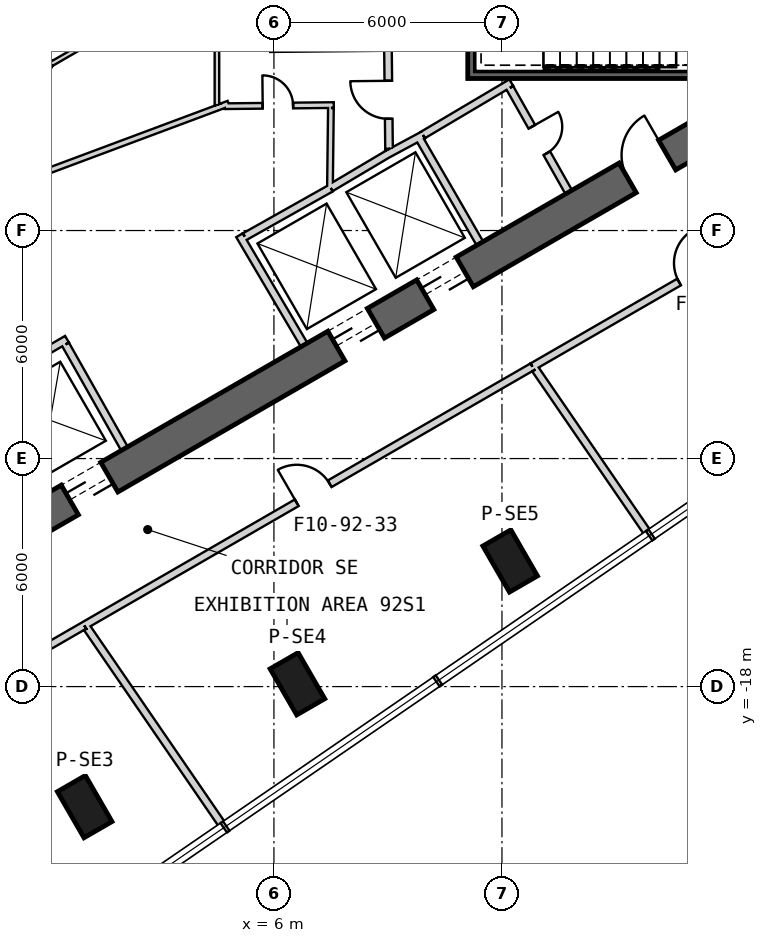
"""IFC4 building model, lengths in metres.
Left out: names, types, materials, properties, quantities, classifications, styles, units other than length and angle.
Written with IfcOpenShell. Run it as: python <this file> out.ifc"""

import sys

from ifc_helpers import new_model, si_unit, direction, frame, frame_2d, origin, origin_2d, place, context, subcontext, project, spatial, rectangle, extrude, element, fill, save


model = new_model("IFC4")
c1 = context("Model", 3, precision=1e-05, world=origin(), true_north=direction((0.0, 1.0)))
c2 = subcontext(c1, "Body", "Model", "MODEL_VIEW")
j1 = project(units=[si_unit("LENGTHUNIT", "METRE"), si_unit("PLANEANGLEUNIT", "RADIAN")], contexts=[c1])
p1 = place(None, origin())
s1 = spatial("IfcSite", under=j1, at=p1, CompositionType="ELEMENT")
p2 = place(p1, origin())
s2 = spatial("IfcBuilding", under=s1, at=p2, CompositionType="ELEMENT")
p3 = place(p2, frame((0.0, 0.0, 404.8)))
s3 = spatial("IfcBuildingStorey", under=s2, at=p3, CompositionType="ELEMENT", Elevation=404.8)
for number, where, z_axis, x_axis in (
    (1, (1.02, -21.159, 0.0), (0.0, 0.0, 1.0), (0.5, -0.866, 0.0)),
    (2, (6.618, -17.927, 0.0), (0.0, 0.0, 1.0), (0.5, -0.866, 0.0)),
    (3, (12.216, -14.695, 0.0), (0.0, 0.0, 1.0), (0.5, -0.866, 0.0)),
):
    element("IfcColumn", number, at=place(p3, frame(where, z_axis=z_axis, x_axis=x_axis)), inside=s3, PredefinedType="COLUMN", context=c2, shape_type="SweptSolid", body=[
        extrude(rectangle(XDim=1.4, YDim=0.85, at=origin_2d()), origin(), (0.0, 0.0, 1.0), 5.25),
    ])
p4 = place(p3, frame((-7.825, -17.97, 0.0), z_axis=(0.0, 0.0, 1.0), x_axis=(0.866028369851, 0.499994862586, 0.0)))
e4 = element("IfcWall", 4, at=p4, inside=s3, PredefinedType="SHEAR", context=c2, shape_type="SweptSolid", body=[
    extrude(rectangle(XDim=31.523, YDim=0.9, at=frame_2d((15.762, 0.0))), origin(), (0.0, 0.0, 1.0), 5.5),
])
p5 = place(p4, frame((7.062, 0.0, 0.0)))
e5 = element("IfcOpeningElement", 5, at=p5, cuts=e4, PredefinedType="OPENING", context=c2, shape_type="SweptSolid", body=[
    extrude(rectangle(XDim=1.2, YDim=2.4, at=frame_2d((0.6, 1.2))), frame((0.0, 0.46, 0.0), z_axis=(0.0, -1.0, 0.0), x_axis=(1.0, 0.0, 0.0)), (0.0, 0.0, 1.0), 0.92),
])
p6 = place(p4, frame((9.762, 0.0, 0.0)))
e6 = element("IfcOpeningElement", 6, at=p6, cuts=e4, PredefinedType="OPENING", context=c2, shape_type="SweptSolid", body=[
    extrude(rectangle(XDim=1.2, YDim=2.4, at=frame_2d((0.6, 1.2))), frame((0.0, 0.46, 0.0), z_axis=(0.0, -1.0, 0.0), x_axis=(1.0, 0.0, 0.0)), (0.0, 0.0, 1.0), 0.92),
])
p7 = place(p4, frame((17.862, 0.0, 0.0)))
e7 = element("IfcOpeningElement", 7, at=p7, cuts=e4, PredefinedType="OPENING", context=c2, shape_type="SweptSolid", body=[
    extrude(rectangle(XDim=1.2, YDim=2.4, at=frame_2d((0.6, 1.2))), frame((0.0, 0.46, 0.0), z_axis=(0.0, -1.0, 0.0), x_axis=(1.0, 0.0, 0.0)), (0.0, 0.0, 1.0), 0.92),
])
p8 = place(p4, frame((20.562, 0.0, 0.0)))
e8 = element("IfcOpeningElement", 8, at=p8, cuts=e4, PredefinedType="OPENING", context=c2, shape_type="SweptSolid", body=[
    extrude(rectangle(XDim=1.2, YDim=2.4, at=frame_2d((0.6, 1.2))), frame((0.0, 0.46, 0.0), z_axis=(0.0, -1.0, 0.0), x_axis=(1.0, 0.0, 0.0)), (0.0, 0.0, 1.0), 0.92),
])
p9 = place(p4, frame((26.712, 0.0, 0.0)))
e9 = element("IfcOpeningElement", 9, at=p9, cuts=e4, PredefinedType="OPENING", context=c2, shape_type="SweptSolid", body=[
    extrude(rectangle(XDim=1.2, YDim=2.4, at=frame_2d((0.6, 1.2))), frame((0.0, 0.46, 0.0), z_axis=(0.0, -1.0, 0.0), x_axis=(1.0, 0.0, 0.0)), (0.0, 0.0, 1.0), 0.92),
])
p10 = place(p4, frame((3.612, 0.0, 0.0)))
e10 = element("IfcOpeningElement", 10, at=p10, cuts=e4, PredefinedType="OPENING", context=c2, shape_type="SweptSolid", body=[
    extrude(rectangle(XDim=1.2, YDim=2.4, at=frame_2d((0.6, 1.2))), frame((0.0, 0.46, 0.0), z_axis=(0.0, -1.0, 0.0), x_axis=(1.0, 0.0, 0.0)), (0.0, 0.0, 1.0), 0.92),
])
p11 = place(p3, frame((-1.077, -9.802, 0.0), z_axis=(0.0, 0.0, 1.0), x_axis=(0.865993522811, 0.500055215401, 0.0)))
e11 = element("IfcWall", 11, at=p11, inside=s3, PredefinedType="PLUMBINGWALL", context=c2, shape_type="SweptSolid", body=[
    extrude(rectangle(XDim=1.884, YDim=0.2, at=frame_2d((0.942, 0.0))), origin(), (0.0, 0.0, 1.0), 5.25),
])
p12 = place(p3, frame((0.517, -8.997, 0.0), z_axis=(0.0, 0.0, 1.0), x_axis=(0.491993409184, -0.87059892334, 0.0)))
e12 = element("IfcWall", 12, at=p12, inside=s3, PredefinedType="PLUMBINGWALL", context=c2, shape_type="SweptSolid", body=[
    extrude(rectangle(XDim=3.15, YDim=0.2, at=frame_2d((1.575, 0.0))), origin(), (0.0, 0.0, 1.0), 5.25),
])
p13 = place(p3, frame((6.795, -9.01, 0.0), z_axis=(0.0, 0.0, 1.0), x_axis=(-0.507997497166, 0.861358544901, 0.0)))
e13 = element("IfcWall", 13, at=p13, inside=s3, PredefinedType="PLUMBINGWALL", context=c2, shape_type="SweptSolid", body=[
    extrude(rectangle(XDim=3.35, YDim=0.2, at=frame_2d((1.675, 0.0))), origin(), (0.0, 0.0, 1.0), 5.25),
])
p14 = place(p3, frame((5.231, -6.161, 0.0), z_axis=(0.0, 0.0, 1.0), x_axis=(0.871540428464, 0.4903236498, 0.0)))
e14 = element("IfcWall", 14, at=p14, inside=s3, PredefinedType="PLUMBINGWALL", context=c2, shape_type="SweptSolid", body=[
    extrude(rectangle(XDim=2.6, YDim=0.2, at=frame_2d((1.3, 0.0))), origin(), (0.0, 0.0, 1.0), 5.25),
])
p15 = place(p3, frame((9.795, -3.525, 0.0), z_axis=(0.0, 0.0, 1.0), x_axis=(0.499984717929, -0.866034226713, 0.0)))
e15 = element("IfcWall", 15, at=p15, inside=s3, PredefinedType="PLUMBINGWALL", context=c2, shape_type="SweptSolid", body=[
    extrude(rectangle(XDim=3.25, YDim=0.2, at=frame_2d((1.625, 0.0))), origin(), (0.0, 0.0, 1.0), 5.25),
])
p16 = place(p3, frame((8.974, -3.999, 0.0), z_axis=(0.0, 0.0, 1.0), x_axis=(0.880907015104, 0.473289373154, 0.0)))
e16 = element("IfcWall", 16, at=p16, inside=s3, PredefinedType="PLUMBINGWALL", context=c2, shape_type="SweptSolid", body=[
    extrude(rectangle(XDim=1.078, YDim=0.2, at=frame_2d((0.539, 0.0))), origin(), (0.0, 0.0, 1.0), 5.25),
])
p17 = place(p3, frame((7.493, -4.878, 0.0), z_axis=(0.0, 0.0, 1.0), x_axis=(0.859981807212, 0.510324691999, 0.0)))
e17 = element("IfcWall", 17, at=p17, inside=s3, PredefinedType="PLUMBINGWALL", context=c2, shape_type="SweptSolid", body=[
    extrude(rectangle(XDim=1.845, YDim=0.2, at=frame_2d((0.922, 0.0))), origin(), (0.0, 0.0, 1.0), 5.25),
])
p18 = place(p3, frame((11.1, -1.9, -0.3), z_axis=(0.0, 0.0, 1.0), x_axis=(1.0, 0.0, 0.0)))
e18 = element("IfcWall", 18, at=p18, inside=s3, PredefinedType="SHEAR", context=c2, shape_type="SweptSolid", body=[
    extrude(rectangle(XDim=7.9, YDim=0.2, at=frame_2d((3.95, 0.0))), origin(), (0.0, 0.0, 1.0), 5.55),
])
p19 = place(p3, frame((11.2, -1.8, -0.3), z_axis=(0.0, 0.0, 1.0), x_axis=(0.0, 1.0, 0.0)))
e19 = element("IfcWall", 19, at=p19, inside=s3, PredefinedType="SHEAR", context=c2, shape_type="SweptSolid", body=[
    extrude(rectangle(XDim=3.6, YDim=0.2, at=frame_2d((1.8, 0.0))), origin(), (0.0, 0.0, 1.0), 5.55),
])
p20 = place(p19, frame((1.25, 0.0, 0.3)))
e20 = element("IfcOpeningElement", 20, at=p20, cuts=e19, PredefinedType="OPENING", context=c2, shape_type="SweptSolid", body=[
    extrude(rectangle(XDim=1.1, YDim=2.1, at=frame_2d((0.55, 1.05))), frame((0.0, 0.11, 0.0), z_axis=(0.0, -1.0, 0.0), x_axis=(1.0, 0.0, 0.0)), (0.0, 0.0, 1.0), 0.22),
])
p21 = place(p3, frame((5.9, -1.201, 0.0), z_axis=(0.0, 0.0, 1.0), x_axis=(0.999950064753, 0.009993397809, 0.0)))
e21 = element("IfcWall", 21, at=p21, inside=s3, PredefinedType="PLUMBINGWALL", context=c2, shape_type="SweptSolid", body=[
    extrude(rectangle(XDim=3.2, YDim=0.2, at=frame_2d((1.6, 0.0))), origin(), (0.0, 0.0, 1.0), 5.25),
])
p22 = place(p3, frame((12.245, -2.109, 0.0), z_axis=(0.0, 0.0, 1.0), x_axis=(-0.860414880418, -0.509594185166, 0.0)))
e22 = element("IfcWall", 22, at=p22, inside=s3, PredefinedType="PARTITIONING", context=c2, shape_type="SweptSolid", body=[
    extrude(rectangle(XDim=2.7, YDim=0.2, at=frame_2d((1.35, 0.0))), origin(), (0.0, 0.0, 1.0), 5.25),
])
p23 = place(p3, frame((13.758, -4.99, 0.0), z_axis=(0.0, 0.0, 1.0), x_axis=(-0.491993409184, 0.87059892334, 0.0)))
e23 = element("IfcWall", 23, at=p23, inside=s3, PredefinedType="PARTITIONING", context=c2, shape_type="SweptSolid", body=[
    extrude(rectangle(XDim=3.15, YDim=0.2, at=frame_2d((1.575, 0.0))), origin(), (0.0, 0.0, 1.0), 5.25),
])
p24 = place(p23, frame((1.175, 0.0, 0.0)))
e24 = element("IfcOpeningElement", 24, at=p24, cuts=e23, PredefinedType="OPENING", context=c2, shape_type="SweptSolid", body=[
    extrude(rectangle(XDim=0.8, YDim=2.1, at=frame_2d((0.4, 1.05))), frame((0.0, 0.11, 0.0), z_axis=(0.0, -1.0, 0.0), x_axis=(1.0, 0.0, 0.0)), (0.0, 0.0, 1.0), 0.22),
])
p25 = place(p3, frame((9.029, -3.851, 0.0), z_axis=(0.0, 0.0, 1.0), x_axis=(-0.010783593937, 0.99994185536, 0.0)))
e25 = element("IfcWall", 25, at=p25, inside=s3, PredefinedType="PARTITIONING", context=c2, shape_type="SweptSolid", body=[
    extrude(rectangle(XDim=2.581, YDim=0.2, at=frame_2d((1.291, 0.0))), origin(), (0.0, 0.0, 1.0), 5.25),
])
p26 = place(p25, frame((0.791, 0.0, 0.0)))
e26 = element("IfcOpeningElement", 26, at=p26, cuts=e25, PredefinedType="OPENING", context=c2, shape_type="SweptSolid", body=[
    extrude(rectangle(XDim=1.0, YDim=2.1, at=frame_2d((0.5, 1.05))), frame((0.0, 0.11, 0.0), z_axis=(0.0, -1.0, 0.0), x_axis=(1.0, 0.0, 0.0)), (0.0, 0.0, 1.0), 0.22),
])
p27 = place(p3, frame((4.807, -2.659, 0.0), z_axis=(0.0, 0.0, 1.0), x_axis=(-0.936818342118, -0.349816228714, 0.0)))
e27 = element("IfcWall", 27, at=p27, inside=s3, PredefinedType="PLUMBINGWALL", context=c2, shape_type="SweptSolid", body=[
    extrude(rectangle(XDim=7.78, YDim=0.15, at=frame_2d((3.89, 0.0))), origin(), (0.0, 0.0, 1.0), 5.25),
])
p28 = place(p3, frame((0.182, -1.535, 0.0), z_axis=(0.0, 0.0, 1.0), x_axis=(-0.499988401207, -0.866032100247, 0.0)))
e28 = element("IfcWall", 28, at=p28, inside=s3, PredefinedType="PARTITIONING", context=c2, shape_type="SweptSolid", body=[
    extrude(rectangle(XDim=4.079, YDim=0.12, at=frame_2d((2.04, 0.0))), origin(), (0.0, 0.0, 1.0), 5.25),
])
p29 = place(p28, frame((1.691, 0.0, 0.0)))
e29 = element("IfcOpeningElement", 29, at=p29, cuts=e28, PredefinedType="OPENING", context=c2, shape_type="SweptSolid", body=[
    extrude(rectangle(XDim=0.8, YDim=2.1, at=frame_2d((0.4, 1.05))), frame((0.0, 0.07, 0.0), z_axis=(0.0, -1.0, 0.0), x_axis=(1.0, 0.0, 0.0)), (0.0, 0.0, 1.0), 0.14),
])
p30 = place(p3, frame((1.432, -0.873, 0.0), z_axis=(0.0, 0.0, 1.0), x_axis=(-0.866029572143, -0.499992780121, 0.0)))
e30 = element("IfcWall", 30, at=p30, inside=s3, PredefinedType="PARTITIONING", context=c2, shape_type="SweptSolid", body=[
    extrude(rectangle(XDim=1.485, YDim=0.12, at=frame_2d((0.743, 0.0))), origin(), (0.0, 0.0, 1.0), 5.25),
])
p31 = place(p3, frame((4.5, -2.7, 0.0), z_axis=(0.0, 0.0, 1.0), x_axis=(0.0, 1.0, 0.0)))
e31 = element("IfcWall", 31, at=p31, inside=s3, PredefinedType="PARTITIONING", context=c2, shape_type="SweptSolid", body=[
    extrude(rectangle(XDim=1.715, YDim=0.12, at=frame_2d((0.857, 0.0))), origin(), (0.0, 0.0, 1.0), 5.25),
])
p32 = place(p3, frame((7.575, -2.699, 0.0), z_axis=(0.0, 0.0, 1.0), x_axis=(-0.999947791603, -0.010218320275, 0.0)))
e32 = element("IfcWall", 32, at=p32, inside=s3, PredefinedType="PLUMBINGWALL", context=c2, shape_type="SweptSolid", body=[
    extrude(rectangle(XDim=2.867, YDim=0.15, at=frame_2d((1.434, 0.0))), origin(), (0.0, 0.0, 1.0), 5.25),
])
p33 = place(p32, frame((1.071, 0.0, 0.0)))
e33 = element("IfcOpeningElement", 33, at=p33, cuts=e32, PredefinedType="OPENING", context=c2, shape_type="SweptSolid", body=[
    extrude(rectangle(XDim=0.8, YDim=2.1, at=frame_2d((0.4, 1.05))), frame((0.0, 0.085, 0.0), z_axis=(0.0, -1.0, 0.0), x_axis=(1.0, 0.0, 0.0)), (0.0, 0.0, 1.0), 0.17),
])
p34 = place(p3, frame((7.475, -4.865, 0.0), z_axis=(0.0, 0.0, 1.0), x_axis=(0.011682810534, 0.99993175364, 0.0)))
e34 = element("IfcWall", 34, at=p34, inside=s3, PredefinedType="PLUMBINGWALL", context=c2, shape_type="SweptSolid", body=[
    extrude(rectangle(XDim=2.09, YDim=0.15, at=frame_2d((1.045, 0.0))), origin(), (0.0, 0.0, 1.0), 5.25),
])
p35 = place(p3, frame((-6.852, -20.93, 0.0), z_axis=(0.0, 0.0, 1.0), x_axis=(0.866016739626, 0.500015006463, 0.0)))
e35 = element("IfcWall", 35, at=p35, inside=s3, PredefinedType="PARTITIONING", context=c2, shape_type="SweptSolid", body=[
    extrude(rectangle(XDim=9.078, YDim=0.2, at=frame_2d((4.539, 0.0))), origin(), (0.0, 0.0, 1.0), 5.25),
])
p36 = place(p35, frame((4.1, 0.0, 0.0)))
e36 = element("IfcOpeningElement", 36, at=p36, cuts=e35, PredefinedType="OPENING", context=c2, shape_type="SweptSolid", body=[
    extrude(rectangle(XDim=1.0, YDim=2.1, at=frame_2d((0.5, 1.05))), frame((0.0, 0.11, 0.0), z_axis=(0.0, -1.0, 0.0), x_axis=(1.0, 0.0, 0.0)), (0.0, 0.0, 1.0), 0.22),
])
p37 = place(p3, frame((1.009, -16.391, 0.0), z_axis=(0.0, 0.0, 1.0), x_axis=(0.866026744585, 0.499997677658, 0.0)))
e37 = element("IfcWall", 37, at=p37, inside=s3, PredefinedType="PARTITIONING", context=c2, shape_type="SweptSolid", body=[
    extrude(rectangle(XDim=13.617, YDim=0.2, at=frame_2d((6.808, 0.0))), origin(), (0.0, 0.0, 1.0), 5.25),
])
p38 = place(p37, frame((6.456, 0.0, 0.0)))
e38 = element("IfcOpeningElement", 38, at=p38, cuts=e37, PredefinedType="OPENING", context=c2, shape_type="SweptSolid", body=[
    extrude(rectangle(XDim=1.0, YDim=2.1, at=frame_2d((0.5, 1.05))), frame((0.0, 0.11, 0.0), z_axis=(0.0, -1.0, 0.0), x_axis=(1.0, 0.0, 0.0)), (0.0, 0.0, 1.0), 0.22),
])
p39 = place(p3, frame((12.802, -9.583, 0.0), z_axis=(0.0, 0.0, 1.0), x_axis=(0.866025905529, 0.499999130952, 0.0)))
e39 = element("IfcWall", 39, at=p39, inside=s3, PredefinedType="PARTITIONING", context=c2, shape_type="SweptSolid", body=[
    extrude(rectangle(XDim=9.904, YDim=0.2, at=frame_2d((4.952, 0.0))), origin(), (0.0, 0.0, 1.0), 5.25),
])
p40 = place(p39, frame((4.456, 0.0, 0.0)))
e40 = element("IfcOpeningElement", 40, at=p40, cuts=e39, PredefinedType="OPENING", context=c2, shape_type="SweptSolid", body=[
    extrude(rectangle(XDim=1.0, YDim=2.1, at=frame_2d((0.5, 1.05))), frame((0.0, 0.11, 0.0), z_axis=(0.0, -1.0, 0.0), x_axis=(1.0, 0.0, 0.0)), (0.0, 0.0, 1.0), 0.22),
])
p41 = place(p3, frame((4.688, -21.709, 0.0), z_axis=(0.0, 0.0, 1.0), x_axis=(-0.565893636681, 0.824478254391, 0.0)))
e41 = element("IfcWall", 41, at=p41, inside=s3, PredefinedType="PARTITIONING", context=c2, shape_type="SweptSolid", body=[
    extrude(rectangle(XDim=6.364, YDim=0.2, at=frame_2d((3.182, 0.0))), origin(), (0.0, 0.0, 1.0), 5.25),
])
p42 = place(p3, frame((12.879, -9.654, 0.0), z_axis=(0.0, 0.0, 1.0), x_axis=(0.565899563161, -0.824474186627, 0.0)))
e42 = element("IfcWall", 42, at=p42, inside=s3, PredefinedType="PARTITIONING", context=c2, shape_type="SweptSolid", body=[
    extrude(rectangle(XDim=5.303, YDim=0.2, at=frame_2d((2.652, 0.0))), origin(), (0.0, 0.0, 1.0), 5.25),
])
p43 = place(p26, origin())
e43 = element("IfcDoor", 43, at=p43, inside=s3, OperationType="SINGLE_SWING_RIGHT", PredefinedType="USERDEFINED", context=c2, shape_type="SweptSolid", body=[
    extrude(rectangle(XDim=1.0, YDim=2.1, at=frame_2d((0.5, 1.05))), frame((0.0, 0.025, 0.0), z_axis=(0.0, -1.0, 0.0), x_axis=(1.0, 0.0, 0.0)), (0.0, 0.0, 1.0), 0.05),
])
fill(e26, e43)
p44 = place(p33, origin())
e44 = element("IfcDoor", 44, at=p44, inside=s3, OperationType="SINGLE_SWING_RIGHT", PredefinedType="USERDEFINED", context=c2, shape_type="SweptSolid", body=[
    extrude(rectangle(XDim=0.8, YDim=2.1, at=frame_2d((0.4, 1.05))), frame((0.0, 0.025, 0.0), z_axis=(0.0, -1.0, 0.0), x_axis=(1.0, 0.0, 0.0)), (0.0, 0.0, 1.0), 0.05),
])
fill(e33, e44)
p45 = place(p24, origin())
e45 = element("IfcDoor", 45, at=p45, inside=s3, OperationType="SINGLE_SWING_RIGHT", PredefinedType="USERDEFINED", context=c2, shape_type="SweptSolid", body=[
    extrude(rectangle(XDim=0.8, YDim=2.1, at=frame_2d((0.4, 1.05))), frame((0.0, 0.025, 0.0), z_axis=(0.0, -1.0, 0.0), x_axis=(1.0, 0.0, 0.0)), (0.0, 0.0, 1.0), 0.05),
])
fill(e24, e45)
p46 = place(p38, origin())
e46 = element("IfcDoor", 46, at=p46, inside=s3, OperationType="SINGLE_SWING_LEFT", PredefinedType="USERDEFINED", context=c2, shape_type="SweptSolid", body=[
    extrude(rectangle(XDim=1.0, YDim=2.1, at=frame_2d((0.5, 1.05))), frame((0.0, 0.025, 0.0), z_axis=(0.0, -1.0, 0.0), x_axis=(1.0, 0.0, 0.0)), (0.0, 0.0, 1.0), 0.05),
])
fill(e38, e46)
p47 = place(p40, origin())
e47 = element("IfcDoor", 47, at=p47, inside=s3, OperationType="SINGLE_SWING_RIGHT", PredefinedType="USERDEFINED", context=c2, shape_type="SweptSolid", body=[
    extrude(rectangle(XDim=1.0, YDim=2.1, at=frame_2d((0.5, 1.05))), frame((0.0, 0.025, 0.0), z_axis=(0.0, -1.0, 0.0), x_axis=(1.0, 0.0, 0.0)), (0.0, 0.0, 1.0), 0.05),
])
fill(e40, e47)
p48 = place(p6, origin())
e48 = element("IfcDoor", 48, at=p48, inside=s3, OperationType="SLIDING_TO_LEFT", PredefinedType="USERDEFINED", context=c2, shape_type="SweptSolid", body=[
    extrude(rectangle(XDim=1.2, YDim=2.4, at=frame_2d((0.6, 1.2))), frame((0.0, 0.025, 0.0), z_axis=(0.0, -1.0, 0.0), x_axis=(1.0, 0.0, 0.0)), (0.0, 0.0, 1.0), 0.05),
])
fill(e6, e48)
p49 = place(p7, origin())
e49 = element("IfcDoor", 49, at=p49, inside=s3, OperationType="SLIDING_TO_LEFT", PredefinedType="USERDEFINED", context=c2, shape_type="SweptSolid", body=[
    extrude(rectangle(XDim=1.2, YDim=2.4, at=frame_2d((0.6, 1.2))), frame((0.0, 0.025, 0.0), z_axis=(0.0, -1.0, 0.0), x_axis=(1.0, 0.0, 0.0)), (0.0, 0.0, 1.0), 0.05),
])
fill(e7, e49)
p50 = place(p8, origin())
e50 = element("IfcDoor", 50, at=p50, inside=s3, OperationType="SLIDING_TO_LEFT", PredefinedType="USERDEFINED", context=c2, shape_type="SweptSolid", body=[
    extrude(rectangle(XDim=1.2, YDim=2.4, at=frame_2d((0.6, 1.2))), frame((0.0, 0.025, 0.0), z_axis=(0.0, -1.0, 0.0), x_axis=(1.0, 0.0, 0.0)), (0.0, 0.0, 1.0), 0.05),
])
fill(e8, e50)
p51 = place(p9, origin())
e51 = element("IfcDoor", 51, at=p51, inside=s3, OperationType="SINGLE_SWING_RIGHT", PredefinedType="USERDEFINED", context=c2, shape_type="SweptSolid", body=[
    extrude(rectangle(XDim=1.2, YDim=2.4, at=frame_2d((0.6, 1.2))), frame((0.0, 0.025, 0.0), z_axis=(0.0, -1.0, 0.0), x_axis=(1.0, 0.0, 0.0)), (0.0, 0.0, 1.0), 0.05),
])
fill(e9, e51)
save(model, sys.argv[1])
